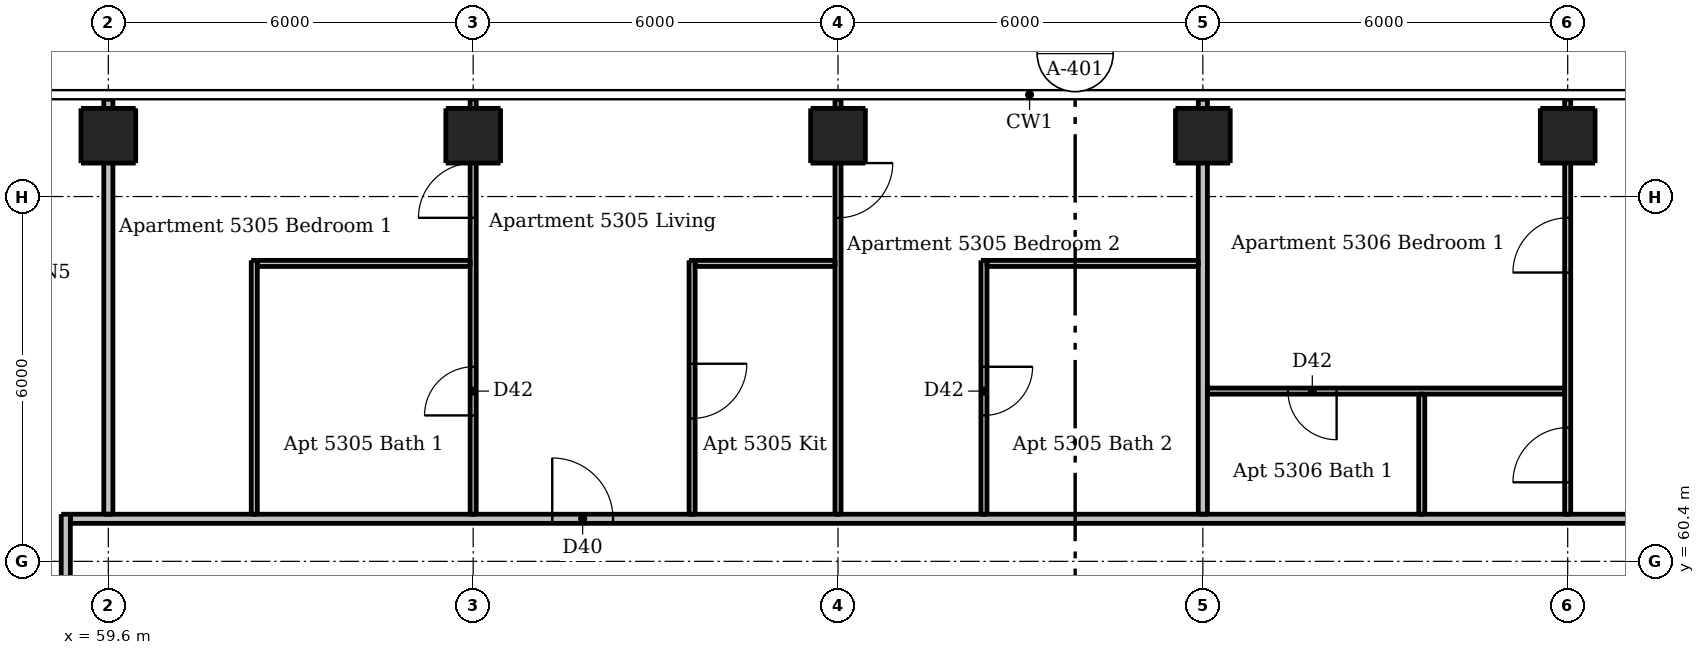
"""IFC4 building model, lengths in metres.
Left out: names, types, materials, properties, quantities, classifications, styles, units other than length and angle.
Written with IfcOpenShell. Run it as: python <this file> out.ifc"""

import sys

from ifc_helpers import new_model, si_unit, direction, frame, frame_2d, origin, origin_2d, place, context, subcontext, project, spatial, rectangle, extrude, element, fill, save


model = new_model("IFC4")
c1 = context("Model", 3, precision=1e-05, world=origin(), true_north=direction((0.0, 1.0)))
c2 = subcontext(c1, "Body", "Model", "MODEL_VIEW")
j1 = project(units=[si_unit("LENGTHUNIT", "METRE"), si_unit("PLANEANGLEUNIT", "RADIAN")], contexts=[c1])
p1 = place(None, origin())
s1 = spatial("IfcSite", under=j1, at=p1, CompositionType="ELEMENT")
p2 = place(p1, origin())
s2 = spatial("IfcBuilding", under=s1, at=p2, CompositionType="ELEMENT")
p3 = place(p2, frame((0.0, 0.0, 200.2)))
s3 = spatial("IfcBuildingStorey", under=s2, at=p3, CompositionType="ELEMENT", Elevation=200.2)
for number, where, z_axis, x_axis in (
    (1, (59.6, 67.4, 0.0), (0.0, 0.0, 1.0), (1.0, 0.0, 0.0)),
    (2, (65.6, 67.4, 0.0), (0.0, 0.0, 1.0), (1.0, 0.0, 0.0)),
    (3, (71.6, 67.4, 0.0), (0.0, 0.0, 1.0), (1.0, 0.0, 0.0)),
    (4, (77.6, 67.4, 0.0), (0.0, 0.0, 1.0), (1.0, 0.0, 0.0)),
    (5, (83.6, 67.4, 0.0), (0.0, 0.0, 1.0), (1.0, 0.0, 0.0)),
):
    element("IfcColumn", number, at=place(p3, frame(where, z_axis=z_axis, x_axis=x_axis)), inside=s3, PredefinedType="COLUMN", context=c2, shape_type="SweptSolid", body=[
        extrude(rectangle(XDim=0.9, YDim=0.9, at=origin_2d()), origin(), (0.0, 0.0, 1.0), 3.05),
    ])
p4 = place(p3, frame((62.0, 61.175, 0.0), z_axis=(0.0, 0.0, 1.0), x_axis=(0.0, 1.0, 0.0)))
e6 = element("IfcWall", 6, at=p4, inside=s3, PredefinedType="PARTITIONING", context=c2, shape_type="SweptSolid", body=[
    extrude(rectangle(XDim=4.175, YDim=0.1, at=frame_2d((2.087, 0.0))), origin(), (0.0, 0.0, 1.0), 3.05),
])
p5 = place(p3, frame((65.6, 61.175, 0.0), z_axis=(0.0, 0.0, 1.0), x_axis=(0.0, 1.0, 0.0)))
e7 = element("IfcWall", 7, at=p5, inside=s3, PredefinedType="PARTITIONING", context=c2, shape_type="SweptSolid", body=[
    extrude(rectangle(XDim=6.825, YDim=0.1, at=frame_2d((3.413, 0.0))), origin(), (0.0, 0.0, 1.0), 2.516),
])
p6 = place(p5, frame((4.875, 0.0, 0.0)))
e8 = element("IfcOpeningElement", 8, at=p6, cuts=e7, PredefinedType="OPENING", context=c2, shape_type="SweptSolid", body=[
    extrude(rectangle(XDim=0.9, YDim=2.1, at=frame_2d((0.45, 1.05))), frame((0.0, 0.06, 0.0), z_axis=(0.0, -1.0, 0.0), x_axis=(1.0, 0.0, 0.0)), (0.0, 0.0, 1.0), 0.12),
])
p7 = place(p5, frame((1.625, 0.0, 0.0)))
e9 = element("IfcOpeningElement", 9, at=p7, cuts=e7, PredefinedType="OPENING", context=c2, shape_type="SweptSolid", body=[
    extrude(rectangle(XDim=0.8, YDim=2.1, at=frame_2d((0.4, 1.05))), frame((0.0, 0.06, 0.0), z_axis=(0.0, -1.0, 0.0), x_axis=(1.0, 0.0, 0.0)), (0.0, 0.0, 1.0), 0.12),
])
p8 = place(p3, frame((69.2, 65.35, 0.0), z_axis=(0.0, 0.0, 1.0), x_axis=(0.0, -1.0, 0.0)))
e10 = element("IfcWall", 10, at=p8, inside=s3, PredefinedType="PARTITIONING", context=c2, shape_type="SweptSolid", body=[
    extrude(rectangle(XDim=4.175, YDim=0.1, at=frame_2d((2.087, 0.0))), origin(), (0.0, 0.0, 1.0), 3.05),
])
p9 = place(p8, frame((1.7, 0.0, 0.0)))
e11 = element("IfcOpeningElement", 11, at=p9, cuts=e10, PredefinedType="OPENING", context=c2, shape_type="SweptSolid", body=[
    extrude(rectangle(XDim=0.9, YDim=2.1, at=frame_2d((0.45, 1.05))), frame((0.0, 0.06, 0.0), z_axis=(0.0, -1.0, 0.0), x_axis=(1.0, 0.0, 0.0)), (0.0, 0.0, 1.0), 0.12),
])
p10 = place(p3, frame((71.6, 68.0, 0.0), z_axis=(0.0, 0.0, 1.0), x_axis=(0.0, -1.0, 0.0)))
e12 = element("IfcWall", 12, at=p10, inside=s3, PredefinedType="PARTITIONING", context=c2, shape_type="SweptSolid", body=[
    extrude(rectangle(XDim=6.825, YDim=0.1, at=frame_2d((3.413, 0.0))), origin(), (0.0, 0.0, 1.0), 2.516),
])
p11 = place(p10, frame((1.05, 0.0, 0.0)))
e13 = element("IfcOpeningElement", 13, at=p11, cuts=e12, PredefinedType="OPENING", context=c2, shape_type="SweptSolid", body=[
    extrude(rectangle(XDim=0.9, YDim=2.1, at=frame_2d((0.45, 1.05))), frame((0.0, 0.06, 0.0), z_axis=(0.0, -1.0, 0.0), x_axis=(1.0, 0.0, 0.0)), (0.0, 0.0, 1.0), 0.12),
])
p12 = place(p3, frame((74.0, 65.35, 0.0), z_axis=(0.0, 0.0, 1.0), x_axis=(0.0, -1.0, 0.0)))
e14 = element("IfcWall", 14, at=p12, inside=s3, PredefinedType="PARTITIONING", context=c2, shape_type="SweptSolid", body=[
    extrude(rectangle(XDim=4.175, YDim=0.1, at=frame_2d((2.087, 0.0))), origin(), (0.0, 0.0, 1.0), 3.05),
])
p13 = place(p12, frame((1.75, 0.0, 0.0)))
e15 = element("IfcOpeningElement", 15, at=p13, cuts=e14, PredefinedType="OPENING", context=c2, shape_type="SweptSolid", body=[
    extrude(rectangle(XDim=0.8, YDim=2.1, at=frame_2d((0.4, 1.05))), frame((0.0, 0.06, 0.0), z_axis=(0.0, -1.0, 0.0), x_axis=(1.0, 0.0, 0.0)), (0.0, 0.0, 1.0), 0.12),
])
p14 = place(p3, frame((81.2, 61.175, 0.0), z_axis=(0.0, 0.0, 1.0), x_axis=(0.0, 1.0, 0.0)))
e16 = element("IfcWall", 16, at=p14, inside=s3, PredefinedType="PARTITIONING", context=c2, shape_type="SweptSolid", body=[
    extrude(rectangle(XDim=1.975, YDim=0.1, at=frame_2d((0.987, 0.0))), origin(), (0.0, 0.0, 1.0), 3.05),
])
p15 = place(p3, frame((83.6, 61.175, 0.0), z_axis=(0.0, 0.0, 1.0), x_axis=(0.0, 1.0, 0.0)))
e17 = element("IfcWall", 17, at=p15, inside=s3, PredefinedType="PARTITIONING", context=c2, shape_type="SweptSolid", body=[
    extrude(rectangle(XDim=6.825, YDim=0.1, at=frame_2d((3.413, 0.0))), origin(), (0.0, 0.0, 1.0), 2.516),
])
p16 = place(p15, frame((0.525, 0.0, 0.0)))
e18 = element("IfcOpeningElement", 18, at=p16, cuts=e17, PredefinedType="OPENING", context=c2, shape_type="SweptSolid", body=[
    extrude(rectangle(XDim=0.9, YDim=2.1, at=frame_2d((0.45, 1.05))), frame((0.0, 0.06, 0.0), z_axis=(0.0, -1.0, 0.0), x_axis=(1.0, 0.0, 0.0)), (0.0, 0.0, 1.0), 0.12),
])
p17 = place(p15, frame((3.975, 0.0, 0.0)))
e19 = element("IfcOpeningElement", 19, at=p17, cuts=e17, PredefinedType="OPENING", context=c2, shape_type="SweptSolid", body=[
    extrude(rectangle(XDim=0.9, YDim=2.1, at=frame_2d((0.45, 1.05))), frame((0.0, 0.06, 0.0), z_axis=(0.0, -1.0, 0.0), x_axis=(1.0, 0.0, 0.0)), (0.0, 0.0, 1.0), 0.12),
])
p18 = place(p3, frame((62.05, 65.3, 0.0), z_axis=(0.0, 0.0, 1.0), x_axis=(1.0, 0.0, 0.0)))
e20 = element("IfcWall", 20, at=p18, inside=s3, PredefinedType="PARTITIONING", context=c2, shape_type="SweptSolid", body=[
    extrude(rectangle(XDim=3.5, YDim=0.1, at=frame_2d((1.75, 0.0))), origin(), (0.0, 0.0, 1.0), 3.05),
])
p19 = place(p3, frame((69.25, 65.3, 0.0), z_axis=(0.0, 0.0, 1.0), x_axis=(1.0, 0.0, 0.0)))
e21 = element("IfcWall", 21, at=p19, inside=s3, PredefinedType="PARTITIONING", context=c2, shape_type="SweptSolid", body=[
    extrude(rectangle(XDim=2.3, YDim=0.1, at=frame_2d((1.15, 0.0))), origin(), (0.0, 0.0, 1.0), 3.05),
])
p20 = place(p3, frame((74.05, 65.3, 0.0), z_axis=(0.0, 0.0, 1.0), x_axis=(1.0, 0.0, 0.0)))
e22 = element("IfcWall", 22, at=p20, inside=s3, PredefinedType="PARTITIONING", context=c2, shape_type="SweptSolid", body=[
    extrude(rectangle(XDim=3.475, YDim=0.1, at=frame_2d((1.737, 0.0))), origin(), (0.0, 0.0, 1.0), 3.05),
])
p21 = place(p3, frame((83.55, 63.2, 0.0), z_axis=(0.0, 0.0, 1.0), x_axis=(-1.0, 0.0, 0.0)))
e23 = element("IfcWall", 23, at=p21, inside=s3, PredefinedType="PARTITIONING", context=c2, shape_type="SweptSolid", body=[
    extrude(rectangle(XDim=5.875, YDim=0.1, at=frame_2d((2.938, 0.0))), origin(), (0.0, 0.0, 1.0), 3.05),
])
p22 = place(p21, frame((3.75, 0.0, 0.0)))
e24 = element("IfcOpeningElement", 24, at=p22, cuts=e23, PredefinedType="OPENING", context=c2, shape_type="SweptSolid", body=[
    extrude(rectangle(XDim=0.8, YDim=2.1, at=frame_2d((0.4, 1.05))), frame((0.0, 0.06, 0.0), z_axis=(0.0, -1.0, 0.0), x_axis=(1.0, 0.0, 0.0)), (0.0, 0.0, 1.0), 0.12),
])
p23 = place(p3, frame((58.9, 30.325, 0.0), z_axis=(0.0, 0.0, 1.0), x_axis=(0.0, 1.0, 0.0)))
e25 = element("IfcWall", 25, at=p23, inside=s3, PredefinedType="PARTITIONING", context=c2, shape_type="SweptSolid", body=[
    extrude(rectangle(XDim=30.85, YDim=0.15, at=frame_2d((15.425, 0.0))), origin(), (0.0, 0.0, 1.0), 3.05),
])
p24 = place(p23, frame((7.375, 0.0, 0.0)))
e26 = element("IfcOpeningElement", 26, at=p24, cuts=e25, PredefinedType="OPENING", context=c2, shape_type="SweptSolid", body=[
    extrude(rectangle(XDim=1.0, YDim=2.1, at=frame_2d((0.5, 1.05))), frame((0.0, 0.085, 0.0), z_axis=(0.0, -1.0, 0.0), x_axis=(1.0, 0.0, 0.0)), (0.0, 0.0, 1.0), 0.17),
])
p25 = place(p23, frame((26.925, 0.0, 0.0)))
e27 = element("IfcOpeningElement", 27, at=p25, cuts=e25, PredefinedType="OPENING", context=c2, shape_type="SweptSolid", body=[
    extrude(rectangle(XDim=1.0, YDim=2.1, at=frame_2d((0.5, 1.05))), frame((0.0, 0.085, 0.0), z_axis=(0.0, -1.0, 0.0), x_axis=(1.0, 0.0, 0.0)), (0.0, 0.0, 1.0), 0.17),
])
p26 = place(p3, frame((59.6, 61.175, 0.0), z_axis=(0.0, 0.0, 1.0), x_axis=(0.0, 1.0, 0.0)))
e28 = element("IfcWall", 28, at=p26, inside=s3, PredefinedType="PARTITIONING", context=c2, shape_type="SweptSolid", body=[
    extrude(rectangle(XDim=6.825, YDim=0.15, at=frame_2d((3.413, 0.0))), origin(), (0.0, 0.0, 1.0), 2.51),
])
p27 = place(p3, frame((77.6, 61.175, 0.0), z_axis=(0.0, 0.0, 1.0), x_axis=(0.0, 1.0, 0.0)))
e29 = element("IfcWall", 29, at=p27, inside=s3, PredefinedType="PARTITIONING", context=c2, shape_type="SweptSolid", body=[
    extrude(rectangle(XDim=6.825, YDim=0.15, at=frame_2d((3.413, 0.0))), origin(), (0.0, 0.0, 1.0), 2.516),
])
p28 = place(p3, frame((58.975, 61.1, 0.0), z_axis=(0.0, 0.0, 1.0), x_axis=(1.0, 0.0, 0.0)))
e30 = element("IfcWall", 30, at=p28, inside=s3, PredefinedType="PARTITIONING", context=c2, shape_type="SweptSolid", body=[
    extrude(rectangle(XDim=29.25, YDim=0.15, at=frame_2d((14.625, 0.0))), origin(), (0.0, 0.0, 1.0), 3.05),
])
p29 = place(p28, frame((7.925, 0.0, 0.0)))
e31 = element("IfcOpeningElement", 31, at=p29, cuts=e30, PredefinedType="OPENING", context=c2, shape_type="SweptSolid", body=[
    extrude(rectangle(XDim=1.0, YDim=2.1, at=frame_2d((0.5, 1.05))), frame((0.0, 0.085, 0.0), z_axis=(0.0, -1.0, 0.0), x_axis=(1.0, 0.0, 0.0)), (0.0, 0.0, 1.0), 0.17),
])
p30 = place(p28, frame((26.475, 0.0, 0.0)))
e32 = element("IfcOpeningElement", 32, at=p30, cuts=e30, PredefinedType="OPENING", context=c2, shape_type="SweptSolid", body=[
    extrude(rectangle(XDim=1.0, YDim=2.1, at=frame_2d((0.5, 1.05))), frame((0.0, 0.085, 0.0), z_axis=(0.0, -1.0, 0.0), x_axis=(1.0, 0.0, 0.0)), (0.0, 0.0, 1.0), 0.17),
])
p31 = place(p29, origin())
e33 = element("IfcDoor", 33, at=p31, inside=s3, OperationType="SINGLE_SWING_LEFT", PredefinedType="DOOR", context=c2, shape_type="SweptSolid", body=[
    extrude(rectangle(XDim=1.0, YDim=2.1, at=frame_2d((0.5, 1.05))), frame((0.0, 0.025, 0.0), z_axis=(0.0, -1.0, 0.0), x_axis=(1.0, 0.0, 0.0)), (0.0, 0.0, 1.0), 0.05),
])
fill(e31, e33)
p32 = place(p9, origin())
e34 = element("IfcDoor", 34, at=p32, inside=s3, OperationType="SINGLE_SWING_LEFT", PredefinedType="DOOR", context=c2, shape_type="SweptSolid", body=[
    extrude(rectangle(XDim=0.9, YDim=2.1, at=frame_2d((0.45, 1.05))), frame((0.0, 0.025, 0.0), z_axis=(0.0, -1.0, 0.0), x_axis=(1.0, 0.0, 0.0)), (0.0, 0.0, 1.0), 0.05),
])
fill(e11, e34)
p33 = place(p6, origin())
e35 = element("IfcDoor", 35, at=p33, inside=s3, OperationType="SINGLE_SWING_LEFT", PredefinedType="DOOR", context=c2, shape_type="SweptSolid", body=[
    extrude(rectangle(XDim=0.9, YDim=2.1, at=frame_2d((0.45, 1.05))), frame((0.0, 0.025, 0.0), z_axis=(0.0, -1.0, 0.0), x_axis=(1.0, 0.0, 0.0)), (0.0, 0.0, 1.0), 0.05),
])
fill(e8, e35)
p34 = place(p7, origin())
e36 = element("IfcDoor", 36, at=p34, inside=s3, OperationType="SINGLE_SWING_LEFT", PredefinedType="DOOR", context=c2, shape_type="SweptSolid", body=[
    extrude(rectangle(XDim=0.8, YDim=2.1, at=frame_2d((0.4, 1.05))), frame((0.0, 0.025, 0.0), z_axis=(0.0, -1.0, 0.0), x_axis=(1.0, 0.0, 0.0)), (0.0, 0.0, 1.0), 0.05),
])
fill(e9, e36)
p35 = place(p11, origin())
e37 = element("IfcDoor", 37, at=p35, inside=s3, OperationType="SINGLE_SWING_LEFT", PredefinedType="DOOR", context=c2, shape_type="SweptSolid", body=[
    extrude(rectangle(XDim=0.9, YDim=2.1, at=frame_2d((0.45, 1.05))), frame((0.0, 0.025, 0.0), z_axis=(0.0, -1.0, 0.0), x_axis=(1.0, 0.0, 0.0)), (0.0, 0.0, 1.0), 0.05),
])
fill(e13, e37)
p36 = place(p13, origin())
e38 = element("IfcDoor", 38, at=p36, inside=s3, OperationType="SINGLE_SWING_LEFT", PredefinedType="DOOR", context=c2, shape_type="SweptSolid", body=[
    extrude(rectangle(XDim=0.8, YDim=2.1, at=frame_2d((0.4, 1.05))), frame((0.0, 0.025, 0.0), z_axis=(0.0, -1.0, 0.0), x_axis=(1.0, 0.0, 0.0)), (0.0, 0.0, 1.0), 0.05),
])
fill(e15, e38)
p37 = place(p16, origin())
e39 = element("IfcDoor", 39, at=p37, inside=s3, OperationType="SINGLE_SWING_LEFT", PredefinedType="DOOR", context=c2, shape_type="SweptSolid", body=[
    extrude(rectangle(XDim=0.9, YDim=2.1, at=frame_2d((0.45, 1.05))), frame((0.0, 0.025, 0.0), z_axis=(0.0, -1.0, 0.0), x_axis=(1.0, 0.0, 0.0)), (0.0, 0.0, 1.0), 0.05),
])
fill(e18, e39)
p38 = place(p17, origin())
e40 = element("IfcDoor", 40, at=p38, inside=s3, OperationType="SINGLE_SWING_LEFT", PredefinedType="DOOR", context=c2, shape_type="SweptSolid", body=[
    extrude(rectangle(XDim=0.9, YDim=2.1, at=frame_2d((0.45, 1.05))), frame((0.0, 0.025, 0.0), z_axis=(0.0, -1.0, 0.0), x_axis=(1.0, 0.0, 0.0)), (0.0, 0.0, 1.0), 0.05),
])
fill(e19, e40)
p39 = place(p22, origin())
e41 = element("IfcDoor", 41, at=p39, inside=s3, OperationType="SINGLE_SWING_LEFT", PredefinedType="DOOR", context=c2, shape_type="SweptSolid", body=[
    extrude(rectangle(XDim=0.8, YDim=2.1, at=frame_2d((0.4, 1.05))), frame((0.0, 0.025, 0.0), z_axis=(0.0, -1.0, 0.0), x_axis=(1.0, 0.0, 0.0)), (0.0, 0.0, 1.0), 0.05),
])
fill(e24, e41)
save(model, sys.argv[1])
